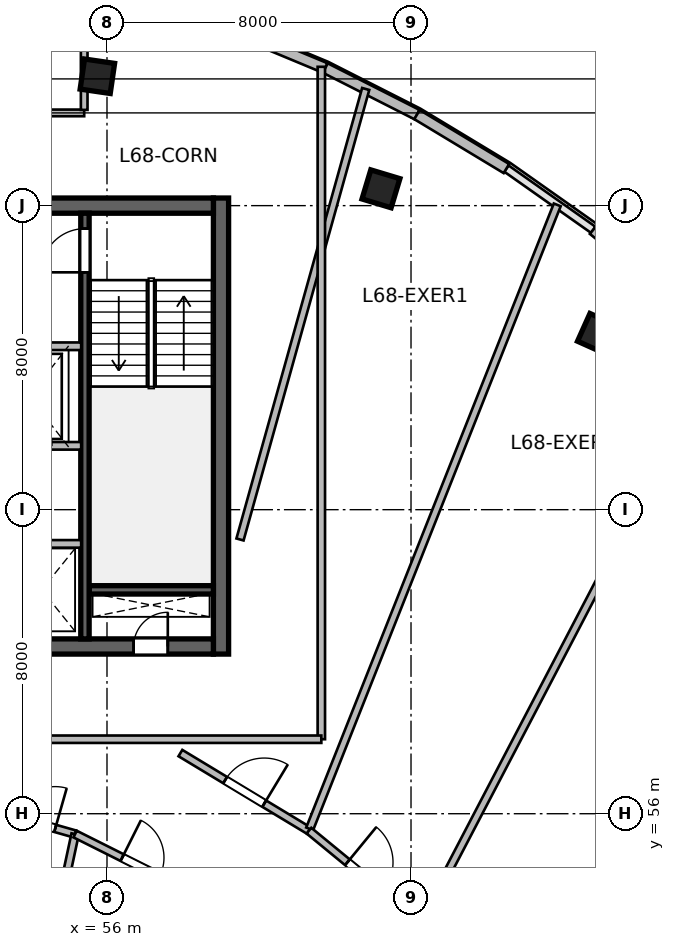
"""IFC4 building model, lengths in metres.
Left out: names, types, materials, properties, quantities, classifications, styles, units other than length and angle.
Written with IfcOpenShell. Run it as: python <this file> out.ifc"""

import sys

from ifc_helpers import new_model, si_unit, direction, frame, frame_2d, origin, origin_2d, place, context, subcontext, project, spatial, rectangle, extrude, source, transform, mapped, element, fill, save


model = new_model("IFC4")
c1 = context("Model", 3, precision=1e-05, world=origin(), true_north=direction((0.0, 1.0)))
c2 = subcontext(c1, "Body", "Model", "MODEL_VIEW")
j1 = project(units=[si_unit("LENGTHUNIT", "METRE"), si_unit("PLANEANGLEUNIT", "RADIAN")], contexts=[c1])
p1 = place(None, origin())
s1 = spatial("IfcSite", under=j1, at=p1, CompositionType="ELEMENT")
p2 = place(p1, origin())
s2 = spatial("IfcBuilding", under=s1, at=p2, CompositionType="ELEMENT")
p3 = place(p2, frame((0.0, 0.0, 279.6)))
s3 = spatial("IfcBuildingStorey", under=s2, at=p3, CompositionType="ELEMENT", Elevation=279.6)
m1 = source(origin(), c2, "Body", "SweptSolid", [
    extrude(rectangle(XDim=12.0, YDim=0.4, at=frame_2d((6.0, 0.0))), origin(), (0.0, 0.0, 1.0), 3.9),
])
p4 = place(p3, frame((59.0, 60.2, 0.0), z_axis=(0.0, 0.0, 1.0), x_axis=(0.0, 1.0, 0.0)))
e1 = element("IfcWall", 1, at=p4, inside=s3, PredefinedType="SHEAR", context=c2, shape_type="MappedRepresentation", body=[
    mapped(m1, transform((0.0, 0.0, 0.0), scale=1.0)),
])
m2 = source(origin(), c2, "Body", "SweptSolid", [
    extrude(rectangle(XDim=21.6, YDim=0.4, at=frame_2d((10.8, 0.0))), origin(), (0.0, 0.0, 1.0), 3.9),
])
p5 = place(p3, frame((37.2, 60.4, 0.0), z_axis=(0.0, 0.0, 1.0), x_axis=(1.0, 0.0, 0.0)))
e2 = element("IfcWall", 2, at=p5, inside=s3, PredefinedType="SHEAR", context=c2, shape_type="MappedRepresentation", body=[
    mapped(m2, transform((0.0, 0.0, 0.0), scale=1.0)),
])
p6 = place(p5, frame((1.1, 0.0, 0.0)))
e3 = element("IfcOpeningElement", 3, at=p6, cuts=e2, PredefinedType="OPENING", context=c2, shape_type="SweptSolid", body=[
    extrude(rectangle(XDim=1.15, YDim=2.15, at=frame_2d((0.575, 1.075))), frame((0.0, 0.21, 0.0), z_axis=(0.0, -1.0, 0.0), x_axis=(1.0, 0.0, 0.0)), (0.0, 0.0, 1.0), 0.42),
])
p7 = place(p5, frame((19.5, 0.0, 0.0)))
e4 = element("IfcOpeningElement", 4, at=p7, cuts=e2, PredefinedType="OPENING", context=c2, shape_type="SweptSolid", body=[
    extrude(rectangle(XDim=0.9, YDim=2.1, at=frame_2d((0.45, 1.05))), frame((0.0, 0.21, 0.0), z_axis=(0.0, -1.0, 0.0), x_axis=(1.0, 0.0, 0.0)), (0.0, 0.0, 1.0), 0.42),
])
p8 = place(p5, frame((12.02, 0.0, 0.0)))
e5 = element("IfcOpeningElement", 5, at=p8, cuts=e2, PredefinedType="OPENING", context=c2, shape_type="SweptSolid", body=[
    extrude(rectangle(XDim=1.6, YDim=2.15, at=frame_2d((0.8, 1.075))), frame((0.0, 0.21, 0.0), z_axis=(0.0, -1.0, 0.0), x_axis=(1.0, 0.0, 0.0)), (0.0, 0.0, 1.0), 0.42),
])
p9 = place(p3, frame((37.2, 72.0, 0.0), z_axis=(0.0, 0.0, 1.0), x_axis=(1.0, 0.0, 0.0)))
e6 = element("IfcWall", 6, at=p9, inside=s3, PredefinedType="SHEAR", context=c2, shape_type="MappedRepresentation", body=[
    mapped(m2, transform((0.0, 0.0, 0.0), scale=1.0)),
])
p10 = place(p9, frame((1.2, 0.0, 0.0)))
e7 = element("IfcOpeningElement", 7, at=p10, cuts=e6, PredefinedType="OPENING", context=c2, shape_type="SweptSolid", body=[
    extrude(rectangle(XDim=0.9, YDim=2.1, at=frame_2d((0.45, 1.05))), frame((0.0, 0.21, 0.0), z_axis=(0.0, -1.0, 0.0), x_axis=(1.0, 0.0, 0.0)), (0.0, 0.0, 1.0), 0.42),
])
p11 = place(p9, frame((14.7, 0.0, 0.0)))
e8 = element("IfcOpeningElement", 8, at=p11, cuts=e6, PredefinedType="OPENING", context=c2, shape_type="SweptSolid", body=[
    extrude(rectangle(XDim=1.2, YDim=2.15, at=frame_2d((0.6, 1.075))), frame((0.0, 0.21, 0.0), z_axis=(0.0, -1.0, 0.0), x_axis=(1.0, 0.0, 0.0)), (0.0, 0.0, 1.0), 0.42),
])
p12 = place(p9, frame((4.15, 0.0, 0.0)))
e9 = element("IfcOpeningElement", 9, at=p12, cuts=e6, PredefinedType="OPENING", context=c2, shape_type="SweptSolid", body=[
    extrude(rectangle(XDim=1.3, YDim=2.15, at=frame_2d((0.65, 1.075))), frame((0.0, 0.21, 0.0), z_axis=(0.0, -1.0, 0.0), x_axis=(1.0, 0.0, 0.0)), (0.0, 0.0, 1.0), 0.42),
])
p13 = place(p9, frame((7.25, 0.0, 0.0)))
e10 = element("IfcOpeningElement", 10, at=p13, cuts=e6, PredefinedType="OPENING", context=c2, shape_type="SweptSolid", body=[
    extrude(rectangle(XDim=0.9, YDim=2.1, at=frame_2d((0.45, 1.05))), frame((0.0, 0.21, 0.0), z_axis=(0.0, -1.0, 0.0), x_axis=(1.0, 0.0, 0.0)), (0.0, 0.0, 1.0), 0.42),
])
m3 = source(origin(), c2, "Body", "SweptSolid", [
    extrude(rectangle(XDim=3.27, YDim=0.22, at=frame_2d((1.635, 0.0))), origin(), (0.0, 0.0, 1.0), 3.9),
])
p14 = place(p3, frame((55.53, 61.89, 0.0), z_axis=(0.0, 0.0, 1.0), x_axis=(1.0, 0.0, 0.0)))
e11 = element("IfcWall", 11, at=p14, inside=s3, PredefinedType="SHEAR", context=c2, shape_type="MappedRepresentation", body=[
    mapped(m3, transform((0.0, 0.0, 0.0), scale=1.0)),
])
m4 = source(origin(), c2, "Body", "SweptSolid", [
    extrude(rectangle(XDim=11.2, YDim=0.22, at=frame_2d((5.6, 0.0))), origin(), (0.0, 0.0, 1.0), 3.9),
])
p15 = place(p3, frame((55.42, 60.6, 0.0), z_axis=(0.0, 0.0, 1.0), x_axis=(0.0, 1.0, 0.0)))
e12 = element("IfcWall", 12, at=p15, inside=s3, PredefinedType="SHEAR", context=c2, shape_type="MappedRepresentation", body=[
    mapped(m4, transform((0.0, 0.0, 0.0), scale=1.0)),
])
p16 = place(p15, frame((9.645, 0.0, 0.0)))
e13 = element("IfcOpeningElement", 13, at=p16, cuts=e12, PredefinedType="OPENING", context=c2, shape_type="SweptSolid", body=[
    extrude(rectangle(XDim=1.15, YDim=2.15, at=frame_2d((0.575, 1.075))), frame((0.0, 0.12, 0.0), z_axis=(0.0, -1.0, 0.0), x_axis=(1.0, 0.0, 0.0)), (0.0, 0.0, 1.0), 0.24),
])
m5 = source(origin(), c2, "Body", "SweptSolid", [
    extrude(rectangle(XDim=0.8, YDim=0.8, at=origin_2d()), origin(), (0.0, 0.0, 1.0), 3.9),
])
for number, where, z_axis, x_axis in (
    (14, (55.747, 75.404, 0.0), (0.0, 0.0, 1.0), (0.143, 0.99, 0.0)),
    (15, (63.209, 72.442, 0.0), (0.0, 0.0, 1.0), (0.289, 0.957, 0.0)),
    (16, (68.91, 68.633, 0.0), (0.0, 0.0, 1.0), (0.409, 0.912, 0.0)),
):
    element("IfcColumn", number, at=place(p3, frame(where, z_axis=z_axis, x_axis=x_axis)), inside=s3, PredefinedType="COLUMN", context=c2, shape_type="MappedRepresentation", body=[
        mapped(m5, transform((0.0, 0.0, 0.0), scale=1.0)),
    ])
m6 = source(origin(), c2, "Body", "SweptSolid", [
    extrude(rectangle(XDim=2.668, YDim=0.28, at=frame_2d((1.334, 0.0))), origin(), (0.0, 0.0, 1.0), 3.64),
])
p17 = place(p3, frame((59.281, 76.645, 0.0), z_axis=(0.0, 0.0, 1.0), x_axis=(0.923290633029, -0.384102078828, 0.0)))
e17 = element("IfcWall", 17, at=p17, inside=s3, PredefinedType="SOLIDWALL", context=c2, shape_type="MappedRepresentation", body=[
    mapped(m6, transform((0.0, 0.0, 0.0), scale=1.0)),
])
m7 = source(origin(), c2, "Body", "SweptSolid", [
    extrude(rectangle(XDim=2.706, YDim=0.28, at=frame_2d((1.353, 0.0))), origin(), (0.0, 0.0, 1.0), 3.64),
])
p18 = place(p3, frame((61.745, 75.62, 0.0), z_axis=(0.0, 0.0, 1.0), x_axis=(0.891648836287, -0.452727680564, 0.0)))
e18 = element("IfcWall", 18, at=p18, inside=s3, PredefinedType="SOLIDWALL", context=c2, shape_type="MappedRepresentation", body=[
    mapped(m7, transform((0.0, 0.0, 0.0), scale=1.0)),
])
m8 = source(origin(), c2, "Body", "SweptSolid", [
    extrude(rectangle(XDim=2.748, YDim=0.28, at=frame_2d((1.374, 0.0))), origin(), (0.0, 0.0, 1.0), 3.64),
])
p19 = place(p3, frame((64.157, 74.396, 0.0), z_axis=(0.0, 0.0, 1.0), x_axis=(0.856149718453, -0.516727838996, 0.0)))
e19 = element("IfcWall", 19, at=p19, inside=s3, PredefinedType="SOLIDWALL", context=c2, shape_type="MappedRepresentation", body=[
    mapped(m8, transform((0.0, 0.0, 0.0), scale=1.0)),
])
m9 = source(origin(), c2, "Body", "SweptSolid", [
    extrude(rectangle(XDim=2.812, YDim=0.28, at=frame_2d((1.406, 0.0))), origin(), (0.0, 0.0, 1.0), 3.64),
])
p20 = place(p3, frame((68.795, 71.365, 0.0), z_axis=(0.0, 0.0, 1.0), x_axis=(0.775880230716, -0.630880232361, 0.0)))
e20 = element("IfcWall", 20, at=p20, inside=s3, PredefinedType="SOLIDWALL", context=c2, shape_type="MappedRepresentation", body=[
    mapped(m9, transform((0.0, 0.0, 0.0), scale=1.0)),
])
m10 = source(origin(), c2, "Body", "SweptSolid", [
    extrude(rectangle(XDim=5.62, YDim=0.2, at=frame_2d((2.81, 0.0))), origin(), (0.0, 0.0, 1.0), 3.64),
])
p21 = place(p3, frame((49.7, 68.3, 0.0), z_axis=(0.0, 0.0, 1.0), x_axis=(1.0, 0.0, 0.0)))
e21 = element("IfcWall", 21, at=p21, inside=s3, PredefinedType="SOLIDWALL", context=c2, shape_type="MappedRepresentation", body=[
    mapped(m10, transform((0.0, 0.0, 0.0), scale=1.0)),
])
p22 = place(p21, frame((1.6, 0.0, 0.0)))
e22 = element("IfcOpeningElement", 22, at=p22, cuts=e21, PredefinedType="OPENING", context=c2, shape_type="SweptSolid", body=[
    extrude(rectangle(XDim=1.1, YDim=2.15, at=frame_2d((0.55, 1.075))), frame((0.0, 0.11, 0.0), z_axis=(0.0, -1.0, 0.0), x_axis=(1.0, 0.0, 0.0)), (0.0, 0.0, 1.0), 0.22),
])
p23 = place(p21, frame((3.7, 0.0, 0.0)))
e23 = element("IfcOpeningElement", 23, at=p23, cuts=e21, PredefinedType="OPENING", context=c2, shape_type="SweptSolid", body=[
    extrude(rectangle(XDim=1.1, YDim=2.15, at=frame_2d((0.55, 1.075))), frame((0.0, 0.11, 0.0), z_axis=(0.0, -1.0, 0.0), x_axis=(1.0, 0.0, 0.0)), (0.0, 0.0, 1.0), 0.22),
])
p24 = place(p3, frame((49.7, 65.68, 0.0), z_axis=(0.0, 0.0, 1.0), x_axis=(1.0, 0.0, 0.0)))
e24 = element("IfcWall", 24, at=p24, inside=s3, PredefinedType="SOLIDWALL", context=c2, shape_type="MappedRepresentation", body=[
    mapped(m10, transform((0.0, 0.0, 0.0), scale=1.0)),
])
m11 = source(origin(), c2, "Body", "SweptSolid", [
    extrude(rectangle(XDim=4.1, YDim=0.2, at=frame_2d((2.05, 0.0))), origin(), (0.0, 0.0, 1.0), 3.64),
])
p25 = place(p3, frame((51.22, 63.1, 0.0), z_axis=(0.0, 0.0, 1.0), x_axis=(1.0, 0.0, 0.0)))
e25 = element("IfcWall", 25, at=p25, inside=s3, PredefinedType="SOLIDWALL", context=c2, shape_type="MappedRepresentation", body=[
    mapped(m11, transform((0.0, 0.0, 0.0), scale=1.0)),
])
m12 = source(origin(), c2, "Body", "SweptSolid", [
    extrude(rectangle(XDim=4.2, YDim=0.175, at=frame_2d((2.1, 0.0))), origin(), (0.0, 0.0, 1.0), 3.64),
])
p26 = place(p3, frame((51.2, 74.44, 0.0), z_axis=(0.0, 0.0, 1.0), x_axis=(1.0, 0.0, 0.0)))
e26 = element("IfcWall", 26, at=p26, inside=s3, PredefinedType="PARTITIONING", context=c2, shape_type="MappedRepresentation", body=[
    mapped(m12, transform((0.0, 0.0, 0.0), scale=1.0)),
])
p27 = place(p26, frame((1.625, 0.0, 0.0)))
e27 = element("IfcOpeningElement", 27, at=p27, cuts=e26, PredefinedType="OPENING", context=c2, shape_type="SweptSolid", body=[
    extrude(rectangle(XDim=0.95, YDim=2.12, at=frame_2d((0.475, 1.06))), frame((0.0, 0.098, 0.0), z_axis=(0.0, -1.0, 0.0), x_axis=(1.0, 0.0, 0.0)), (0.0, 0.0, 1.0), 0.195),
])
m13 = source(origin(), c2, "Body", "SweptSolid", [
    extrude(rectangle(XDim=2.403, YDim=0.175, at=frame_2d((1.201, 0.0))), origin(), (0.0, 0.0, 1.0), 3.64),
])
p28 = place(p3, frame((55.4, 74.519, 0.0), z_axis=(0.0, 0.0, 1.0), x_axis=(0.0, 1.0, 0.0)))
e28 = element("IfcWall", 28, at=p28, inside=s3, PredefinedType="PARTITIONING", context=c2, shape_type="MappedRepresentation", body=[
    mapped(m13, transform((0.0, 0.0, 0.0), scale=1.0)),
])
m14 = source(origin(), c2, "Body", "SweptSolid", [
    extrude(rectangle(XDim=3.687, YDim=0.195, at=frame_2d((1.843, 0.0))), origin(), (0.0, 0.0, 1.0), 3.64),
])
p29 = place(p3, frame((51.616, 56.474, 0.0), z_axis=(0.0, 0.0, 1.0), x_axis=(0.961753532248, -0.27391630694, 0.0)))
e29 = element("IfcWall", 29, at=p29, inside=s3, PredefinedType="PARTITIONING", context=c2, shape_type="MappedRepresentation", body=[
    mapped(m14, transform((0.0, 0.0, 0.0), scale=1.0)),
])
p30 = place(p29, frame((2.043, 0.0, 0.0)))
e30 = element("IfcOpeningElement", 30, at=p30, cuts=e29, PredefinedType="OPENING", context=c2, shape_type="SweptSolid", body=[
    extrude(rectangle(XDim=1.1, YDim=2.15, at=frame_2d((0.55, 1.075))), frame((0.0, 0.107, 0.0), z_axis=(0.0, -1.0, 0.0), x_axis=(1.0, 0.0, 0.0)), (0.0, 0.0, 1.0), 0.215),
])
m15 = source(origin(), c2, "Body", "SweptSolid", [
    extrude(rectangle(XDim=3.015, YDim=0.195, at=frame_2d((1.507, 0.0))), origin(), (0.0, 0.0, 1.0), 3.64),
])
p31 = place(p3, frame((54.53, 52.517, 0.0), z_axis=(0.0, 0.0, 1.0), x_axis=(0.209258086484, 0.977860446711, 0.0)))
e31 = element("IfcWall", 31, at=p31, inside=s3, PredefinedType="PARTITIONING", context=c2, shape_type="MappedRepresentation", body=[
    mapped(m15, transform((0.0, 0.0, 0.0), scale=1.0)),
])
m16 = source(origin(), c2, "Body", "SweptSolid", [
    extrude(rectangle(XDim=4.271, YDim=0.195, at=frame_2d((2.135, 0.0))), origin(), (0.0, 0.0, 1.0), 3.64),
])
p32 = place(p3, frame((55.161, 55.465, 0.0), z_axis=(0.0, 0.0, 1.0), x_axis=(0.894061035522, -0.447945158207, 0.0)))
e32 = element("IfcWall", 32, at=p32, inside=s3, PredefinedType="PARTITIONING", context=c2, shape_type="MappedRepresentation", body=[
    mapped(m16, transform((0.0, 0.0, 0.0), scale=1.0)),
])
p33 = place(p32, frame((1.385, 0.0, 0.0)))
e33 = element("IfcOpeningElement", 33, at=p33, cuts=e32, PredefinedType="OPENING", context=c2, shape_type="SweptSolid", body=[
    extrude(rectangle(XDim=1.1, YDim=2.15, at=frame_2d((0.55, 1.075))), frame((0.0, 0.107, 0.0), z_axis=(0.0, -1.0, 0.0), x_axis=(1.0, 0.0, 0.0)), (0.0, 0.0, 1.0), 0.215),
])
m17 = source(origin(), c2, "Body", "SweptSolid", [
    extrude(rectangle(XDim=3.951, YDim=0.195, at=frame_2d((1.975, 0.0))), origin(), (0.0, 0.0, 1.0), 3.64),
])
p34 = place(p3, frame((57.932, 57.596, 0.0), z_axis=(0.0, 0.0, 1.0), x_axis=(0.856137696849, -0.51674775668, 0.0)))
e34 = element("IfcWall", 34, at=p34, inside=s3, PredefinedType="PARTITIONING", context=c2, shape_type="MappedRepresentation", body=[
    mapped(m17, transform((0.0, 0.0, 0.0), scale=1.0)),
])
p35 = place(p34, frame((1.375, 0.0, 0.0)))
e35 = element("IfcOpeningElement", 35, at=p35, cuts=e34, PredefinedType="OPENING", context=c2, shape_type="SweptSolid", body=[
    extrude(rectangle(XDim=1.2, YDim=2.15, at=frame_2d((0.6, 1.075))), frame((0.0, 0.107, 0.0), z_axis=(0.0, -1.0, 0.0), x_axis=(1.0, 0.0, 0.0)), (0.0, 0.0, 1.0), 0.215),
])
m18 = source(origin(), c2, "Body", "SweptSolid", [
    extrude(rectangle(XDim=12.307, YDim=0.195, at=frame_2d((6.153, 0.0))), origin(), (0.0, 0.0, 1.0), 3.64),
])
p36 = place(p3, frame((59.5, 63.216, 0.0), z_axis=(0.0, 0.0, 1.0), x_axis=(0.268768150257, 0.96320490105, 0.0)))
e36 = element("IfcWall", 36, at=p36, inside=s3, PredefinedType="PARTITIONING", context=c2, shape_type="MappedRepresentation", body=[
    mapped(m18, transform((0.0, 0.0, 0.0), scale=1.0)),
])
m19 = source(origin(), c2, "Body", "SweptSolid", [
    extrude(rectangle(XDim=17.664, YDim=0.195, at=frame_2d((8.832, 0.0))), origin(), (0.0, 0.0, 1.0), 3.64),
])
p37 = place(p3, frame((61.333, 55.602, 0.0), z_axis=(0.0, 0.0, 1.0), x_axis=(0.368827513738, 0.929497856431, 0.0)))
e37 = element("IfcWall", 37, at=p37, inside=s3, PredefinedType="PARTITIONING", context=c2, shape_type="MappedRepresentation", body=[
    mapped(m19, transform((0.0, 0.0, 0.0), scale=1.0)),
])
m20 = source(origin(), c2, "Body", "SweptSolid", [
    extrude(rectangle(XDim=3.82, YDim=0.195, at=frame_2d((1.91, 0.0))), origin(), (0.0, 0.0, 1.0), 3.64),
])
p38 = place(p3, frame((61.314, 55.554, 0.0), z_axis=(0.0, 0.0, 1.0), x_axis=(0.772805728445, -0.63464266015, 0.0)))
e38 = element("IfcWall", 38, at=p38, inside=s3, PredefinedType="PARTITIONING", context=c2, shape_type="MappedRepresentation", body=[
    mapped(m20, transform((0.0, 0.0, 0.0), scale=1.0)),
])
p39 = place(p38, frame((1.31, 0.0, 0.0)))
e39 = element("IfcOpeningElement", 39, at=p39, cuts=e38, PredefinedType="OPENING", context=c2, shape_type="SweptSolid", body=[
    extrude(rectangle(XDim=1.2, YDim=2.15, at=frame_2d((0.6, 1.075))), frame((0.0, 0.107, 0.0), z_axis=(0.0, -1.0, 0.0), x_axis=(1.0, 0.0, 0.0)), (0.0, 0.0, 1.0), 0.215),
])
m21 = source(origin(), c2, "Body", "SweptSolid", [
    extrude(rectangle(XDim=16.43, YDim=0.195, at=frame_2d((8.215, 0.0))), origin(), (0.0, 0.0, 1.0), 3.64),
])
p40 = place(p3, frame((64.29, 53.174, 0.0), z_axis=(0.0, 0.0, 1.0), x_axis=(0.463119459371, 0.886295868405, 0.0)))
e40 = element("IfcWall", 40, at=p40, inside=s3, PredefinedType="PARTITIONING", context=c2, shape_type="MappedRepresentation", body=[
    mapped(m21, transform((0.0, 0.0, 0.0), scale=1.0)),
])
m22 = source(origin(), c2, "Body", "SweptSolid", [
    extrude(rectangle(XDim=17.693, YDim=0.195, at=frame_2d((8.847, 0.0))), origin(), (0.0, 0.0, 1.0), 3.64),
])
p41 = place(p3, frame((61.64, 57.96, 0.0), z_axis=(0.0, 0.0, 1.0), x_axis=(0.0, 1.0, 0.0)))
e41 = element("IfcWall", 41, at=p41, inside=s3, PredefinedType="PARTITIONING", context=c2, shape_type="MappedRepresentation", body=[
    mapped(m22, transform((0.0, 0.0, 0.0), scale=1.0)),
])
m23 = source(origin(), c2, "Body", "SweptSolid", [
    extrude(rectangle(XDim=12.39, YDim=0.195, at=frame_2d((6.195, 0.0))), origin(), (0.0, 0.0, 1.0), 3.64),
])
p42 = place(p3, frame((49.25, 57.96, 0.0), z_axis=(0.0, 0.0, 1.0), x_axis=(1.0, 0.0, 0.0)))
e42 = element("IfcWall", 42, at=p42, inside=s3, PredefinedType="PARTITIONING", context=c2, shape_type="MappedRepresentation", body=[
    mapped(m23, transform((0.0, 0.0, 0.0), scale=1.0)),
])
m24 = source(origin(), c2, "Body", "SweptSolid", [
    extrude(rectangle(XDim=0.9, YDim=2.1, at=frame_2d((0.45, 1.05))), frame((0.0, 0.025, 0.0), z_axis=(0.0, -1.0, 0.0), x_axis=(1.0, 0.0, 0.0)), (0.0, 0.0, 1.0), 0.05),
])
p43 = place(p7, origin())
e43 = element("IfcDoor", 43, at=p43, inside=s3, OperationType="SINGLE_SWING_RIGHT", PredefinedType="DOOR", context=c2, shape_type="MappedRepresentation", body=[
    mapped(m24, transform((0.0, 0.0, 0.0), scale=1.0)),
])
fill(e4, e43)
m25 = source(origin(), c2, "Body", "SweptSolid", [
    extrude(rectangle(XDim=1.15, YDim=2.15, at=frame_2d((0.575, 1.075))), frame((0.0, 0.025, 0.0), z_axis=(0.0, -1.0, 0.0), x_axis=(1.0, 0.0, 0.0)), (0.0, 0.0, 1.0), 0.05),
])
p44 = place(p16, origin())
e44 = element("IfcDoor", 44, at=p44, inside=s3, OperationType="SINGLE_SWING_LEFT", PredefinedType="DOOR", context=c2, shape_type="MappedRepresentation", body=[
    mapped(m25, transform((0.0, 0.0, 0.0), scale=1.0)),
])
fill(e13, e44)
m26 = source(origin(), c2, "Body", "SweptSolid", [
    extrude(rectangle(XDim=1.1, YDim=2.15, at=frame_2d((0.55, 1.075))), frame((0.0, 0.025, 0.0), z_axis=(0.0, -1.0, 0.0), x_axis=(1.0, 0.0, 0.0)), (0.0, 0.0, 1.0), 0.05),
])
p45 = place(p30, origin())
e45 = element("IfcDoor", 45, at=p45, inside=s3, OperationType="SINGLE_SWING_RIGHT", PredefinedType="DOOR", context=c2, shape_type="MappedRepresentation", body=[
    mapped(m26, transform((0.0, 0.0, 0.0), scale=1.0)),
])
fill(e30, e45)
p46 = place(p33, origin())
e46 = element("IfcDoor", 46, at=p46, inside=s3, OperationType="SINGLE_SWING_LEFT", PredefinedType="DOOR", context=c2, shape_type="MappedRepresentation", body=[
    mapped(m26, transform((0.0, 0.0, 0.0), scale=1.0)),
])
fill(e33, e46)
m27 = source(origin(), c2, "Body", "SweptSolid", [
    extrude(rectangle(XDim=1.2, YDim=2.15, at=frame_2d((0.6, 1.075))), frame((0.0, 0.025, 0.0), z_axis=(0.0, -1.0, 0.0), x_axis=(1.0, 0.0, 0.0)), (0.0, 0.0, 1.0), 0.05),
])
p47 = place(p35, origin())
e47 = element("IfcDoor", 47, at=p47, inside=s3, OperationType="SINGLE_SWING_RIGHT", PredefinedType="DOOR", context=c2, shape_type="MappedRepresentation", body=[
    mapped(m27, transform((0.0, 0.0, 0.0), scale=1.0)),
])
fill(e35, e47)
p48 = place(p39, origin())
e48 = element("IfcDoor", 48, at=p48, inside=s3, OperationType="SINGLE_SWING_LEFT", PredefinedType="DOOR", context=c2, shape_type="MappedRepresentation", body=[
    mapped(m27, transform((0.0, 0.0, 0.0), scale=1.0)),
])
fill(e39, e48)
save(model, sys.argv[1])
